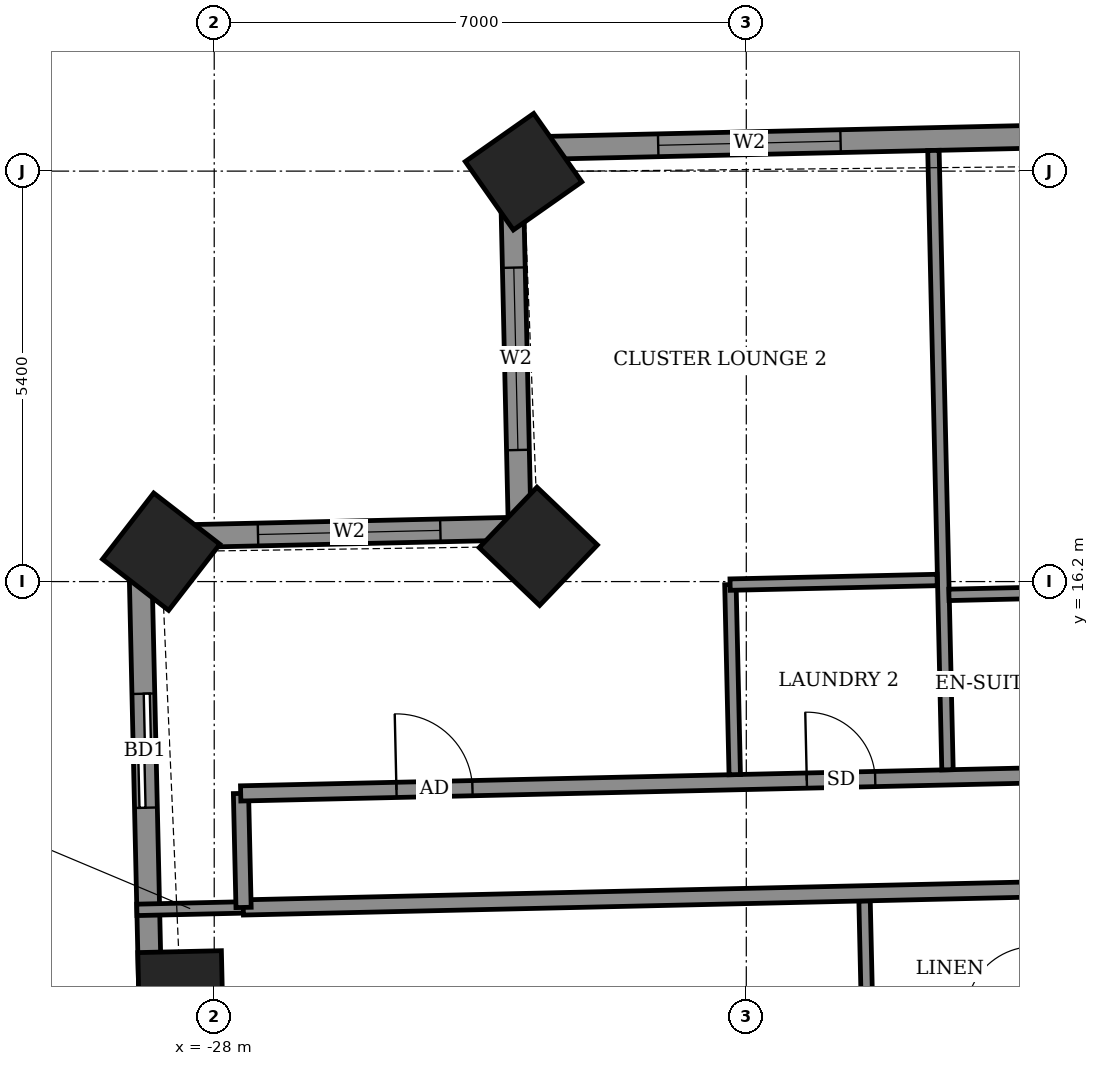
"""IFC4 building model, lengths in metres.
Left out: names, types, materials, properties, quantities, classifications, styles, units other than length and angle.
Written with IfcOpenShell. Run it as: python <this file> out.ifc"""

import sys

from ifc_helpers import new_model, si_unit, direction, frame, frame_2d, origin, origin_2d, place, context, subcontext, project, spatial, rectangle, extrude, element, fill, save


model = new_model("IFC4")
c1 = context("Model", 3, precision=1e-05, world=origin(), true_north=direction((0.0, 1.0)))
c2 = subcontext(c1, "Body", "Model", "MODEL_VIEW")
j1 = project(units=[si_unit("LENGTHUNIT", "METRE"), si_unit("PLANEANGLEUNIT", "RADIAN")], contexts=[c1])
p1 = place(None, origin())
s1 = spatial("IfcSite", under=j1, at=p1, CompositionType="ELEMENT")
p2 = place(p1, origin())
s2 = spatial("IfcBuilding", under=s1, at=p2, CompositionType="ELEMENT")
p3 = place(p2, frame((0.0, 0.0, 231.1)))
s3 = spatial("IfcBuildingStorey", under=s2, at=p3, CompositionType="ELEMENT", Elevation=231.1)
for number, where, z_axis, x_axis in (
    (1, (-23.931, 21.592, -0.55), (0.0, 0.0, 1.0), (-0.818, -0.575, 0.0)),
    (2, (-23.736, 16.664, -0.55), (0.0, 0.0, 1.0), (-0.691, -0.723, 0.0)),
    (3, (-28.698, 16.593, -0.55), (0.0, 0.0, 1.0), (-0.612, -0.791, 0.0)),
    (4, (-28.443, 10.781, -0.55), (0.0, 0.0, 1.0), (0.023, -1.0, 0.0)),
):
    element("IfcColumn", number, at=place(p3, frame(where, z_axis=z_axis, x_axis=x_axis)), inside=s3, PredefinedType="COLUMN", context=c2, shape_type="SweptSolid", body=[
        extrude(rectangle(XDim=1.1, YDim=1.1, at=origin_2d()), origin(), (0.0, 0.0, 1.0), 3.6),
    ])
p4 = place(p3, frame((20.403, 22.905, 0.0), z_axis=(0.0, 0.0, 1.0), x_axis=(-0.99974298964, -0.022670568288, 0.0)))
e5 = element("IfcWall", 5, at=p4, inside=s3, PredefinedType="SOLIDWALL", context=c2, shape_type="SweptSolid", body=[
    extrude(rectangle(XDim=44.509, YDim=0.3, at=frame_2d((22.254, 0.0))), origin(), (0.0, 0.0, 1.0), 2.55),
])
p5 = place(p4, frame((1.62, 0.0, 0.0)))
e6 = element("IfcOpeningElement", 6, at=p5, cuts=e5, PredefinedType="OPENING", context=c2, shape_type="SweptSolid", body=[
    extrude(rectangle(XDim=1.5, YDim=2.4, at=frame_2d((0.75, 1.2))), frame((0.0, 0.16, 0.0), z_axis=(0.0, -1.0, 0.0), x_axis=(1.0, 0.0, 0.0)), (0.0, 0.0, 1.0), 0.32),
])
p6 = place(p4, frame((4.813, 0.0, 0.0)))
e7 = element("IfcOpeningElement", 7, at=p6, cuts=e5, PredefinedType="OPENING", context=c2, shape_type="SweptSolid", body=[
    extrude(rectangle(XDim=1.5, YDim=2.4, at=frame_2d((0.75, 1.2))), frame((0.0, 0.16, 0.0), z_axis=(0.0, -1.0, 0.0), x_axis=(1.0, 0.0, 0.0)), (0.0, 0.0, 1.0), 0.32),
])
p7 = place(p4, frame((9.833, 0.0, 0.0)))
e8 = element("IfcOpeningElement", 8, at=p7, cuts=e5, PredefinedType="OPENING", context=c2, shape_type="SweptSolid", body=[
    extrude(rectangle(XDim=1.5, YDim=2.4, at=frame_2d((0.75, 1.2))), frame((0.0, 0.16, 0.0), z_axis=(0.0, -1.0, 0.0), x_axis=(1.0, 0.0, 0.0)), (0.0, 0.0, 1.0), 0.32),
])
p8 = place(p4, frame((15.522, 0.0, 0.0)))
e9 = element("IfcOpeningElement", 9, at=p8, cuts=e5, PredefinedType="OPENING", context=c2, shape_type="SweptSolid", body=[
    extrude(rectangle(XDim=1.2, YDim=2.4, at=frame_2d((0.6, 1.2))), frame((0.0, 0.16, 0.0), z_axis=(0.0, -1.0, 0.0), x_axis=(1.0, 0.0, 0.0)), (0.0, 0.0, 1.0), 0.32),
])
p9 = place(p4, frame((18.558, 0.0, 0.0)))
e10 = element("IfcOpeningElement", 10, at=p9, cuts=e5, PredefinedType="OPENING", context=c2, shape_type="SweptSolid", body=[
    extrude(rectangle(XDim=1.5, YDim=2.4, at=frame_2d((0.75, 1.2))), frame((0.0, 0.16, 0.0), z_axis=(0.0, -1.0, 0.0), x_axis=(1.0, 0.0, 0.0)), (0.0, 0.0, 1.0), 0.32),
])
p10 = place(p4, frame((23.456, 0.0, 0.0)))
e11 = element("IfcOpeningElement", 11, at=p10, cuts=e5, PredefinedType="OPENING", context=c2, shape_type="SweptSolid", body=[
    extrude(rectangle(XDim=1.5, YDim=2.4, at=frame_2d((0.75, 1.2))), frame((0.0, 0.16, 0.0), z_axis=(0.0, -1.0, 0.0), x_axis=(1.0, 0.0, 0.0)), (0.0, 0.0, 1.0), 0.32),
])
p11 = place(p4, frame((26.89, 0.0, 0.0)))
e12 = element("IfcOpeningElement", 12, at=p11, cuts=e5, PredefinedType="OPENING", context=c2, shape_type="SweptSolid", body=[
    extrude(rectangle(XDim=1.5, YDim=2.4, at=frame_2d((0.75, 1.2))), frame((0.0, 0.16, 0.0), z_axis=(0.0, -1.0, 0.0), x_axis=(1.0, 0.0, 0.0)), (0.0, 0.0, 1.0), 0.32),
])
p12 = place(p4, frame((31.708, 0.0, 0.0)))
e13 = element("IfcOpeningElement", 13, at=p12, cuts=e5, PredefinedType="OPENING", context=c2, shape_type="SweptSolid", body=[
    extrude(rectangle(XDim=1.5, YDim=2.4, at=frame_2d((0.75, 1.2))), frame((0.0, 0.16, 0.0), z_axis=(0.0, -1.0, 0.0), x_axis=(1.0, 0.0, 0.0)), (0.0, 0.0, 1.0), 0.32),
])
p13 = place(p4, frame((35.024, 0.0, 0.0)))
e14 = element("IfcOpeningElement", 14, at=p13, cuts=e5, PredefinedType="OPENING", context=c2, shape_type="SweptSolid", body=[
    extrude(rectangle(XDim=1.5, YDim=2.4, at=frame_2d((0.75, 1.2))), frame((0.0, 0.16, 0.0), z_axis=(0.0, -1.0, 0.0), x_axis=(1.0, 0.0, 0.0)), (0.0, 0.0, 1.0), 0.32),
])
p14 = place(p4, frame((40.173, 0.0, 0.9)))
e15 = element("IfcOpeningElement", 15, at=p14, cuts=e5, PredefinedType="OPENING", context=c2, shape_type="SweptSolid", body=[
    extrude(rectangle(XDim=2.4, YDim=1.5, at=frame_2d((1.2, 0.75))), frame((0.0, 0.16, 0.0), z_axis=(0.0, -1.0, 0.0), x_axis=(1.0, 0.0, 0.0)), (0.0, 0.0, 1.0), 0.32),
])
p15 = place(p3, frame((-24.094, 21.896, 0.0), z_axis=(0.0, 0.0, 1.0), x_axis=(0.022606059803, -0.999744450377, 0.0)))
e16 = element("IfcWall", 16, at=p15, inside=s3, PredefinedType="SOLIDWALL", context=c2, shape_type="SweptSolid", body=[
    extrude(rectangle(XDim=5.0, YDim=0.3, at=frame_2d((2.5, 0.0))), origin(), (0.0, 0.0, 1.0), 2.55),
])
p16 = place(p15, frame((1.566, 0.0, 0.9)))
e17 = element("IfcOpeningElement", 17, at=p16, cuts=e16, PredefinedType="OPENING", context=c2, shape_type="SweptSolid", body=[
    extrude(rectangle(XDim=2.4, YDim=1.5, at=frame_2d((1.2, 0.75))), frame((0.0, 0.16, 0.0), z_axis=(0.0, -1.0, 0.0), x_axis=(1.0, 0.0, 0.0)), (0.0, 0.0, 1.0), 0.32),
])
p17 = place(p3, frame((-23.981, 16.897, 0.0), z_axis=(0.0, 0.0, 1.0), x_axis=(-0.999744350543, -0.022610474516, 0.0)))
e18 = element("IfcWall", 18, at=p17, inside=s3, PredefinedType="SOLIDWALL", context=c2, shape_type="SweptSolid", body=[
    extrude(rectangle(XDim=4.999, YDim=0.3, at=frame_2d((2.5, 0.0))), origin(), (0.0, 0.0, 1.0), 2.55),
])
p18 = place(p17, frame((1.044, 0.0, 0.9)))
e19 = element("IfcOpeningElement", 19, at=p18, cuts=e18, PredefinedType="OPENING", context=c2, shape_type="SweptSolid", body=[
    extrude(rectangle(XDim=2.4, YDim=1.5, at=frame_2d((1.2, 0.75))), frame((0.0, 0.16, 0.0), z_axis=(0.0, -1.0, 0.0), x_axis=(1.0, 0.0, 0.0)), (0.0, 0.0, 1.0), 0.32),
])
p19 = place(p3, frame((-28.979, 16.784, 0.0), z_axis=(0.0, 0.0, 1.0), x_axis=(0.022640773908, -0.999743664825, 0.0)))
e20 = element("IfcWall", 20, at=p19, inside=s3, PredefinedType="SOLIDWALL", context=c2, shape_type="SweptSolid", body=[
    extrude(rectangle(XDim=12.724, YDim=0.3, at=frame_2d((6.362, 0.0))), origin(), (0.0, 0.0, 1.0), 2.55),
])
p20 = place(p19, frame((2.06, 0.0, 0.0)))
e21 = element("IfcOpeningElement", 21, at=p20, cuts=e20, PredefinedType="OPENING", context=c2, shape_type="SweptSolid", body=[
    extrude(rectangle(XDim=1.5, YDim=2.4, at=frame_2d((0.75, 1.2))), frame((0.0, 0.16, 0.0), z_axis=(0.0, -1.0, 0.0), x_axis=(1.0, 0.0, 0.0)), (0.0, 0.0, 1.0), 0.32),
])
p21 = place(p19, frame((7.169, 0.0, 0.9)))
e22 = element("IfcOpeningElement", 22, at=p21, cuts=e20, PredefinedType="OPENING", context=c2, shape_type="SweptSolid", body=[
    extrude(rectangle(XDim=1.2, YDim=1.5, at=frame_2d((0.6, 0.75))), frame((0.0, 0.16, 0.0), z_axis=(0.0, -1.0, 0.0), x_axis=(1.0, 0.0, 0.0)), (0.0, 0.0, 1.0), 0.32),
])
p22 = place(p19, frame((9.899, 0.0, 0.9)))
e23 = element("IfcOpeningElement", 23, at=p22, cuts=e20, PredefinedType="OPENING", context=c2, shape_type="SweptSolid", body=[
    extrude(rectangle(XDim=1.2, YDim=1.5, at=frame_2d((0.6, 0.75))), frame((0.0, 0.16, 0.0), z_axis=(0.0, -1.0, 0.0), x_axis=(1.0, 0.0, 0.0)), (0.0, 0.0, 1.0), 0.32),
])
p23 = place(p3, frame((-19.392, 9.699, 0.0), z_axis=(0.0, 0.0, 1.0), x_axis=(-0.022603288534, 0.999744513037, 0.0)))
e24 = element("IfcWall", 24, at=p23, inside=s3, PredefinedType="PARTITIONING", context=c2, shape_type="SweptSolid", body=[
    extrude(rectangle(XDim=2.301, YDim=0.15, at=frame_2d((1.15, 0.0))), origin(), (0.0, 0.0, 1.0), 3.05),
])
p24 = place(p3, frame((-29.018, 11.881, 0.0), z_axis=(0.0, 0.0, 1.0), x_axis=(0.999740667531, 0.022772739949, 0.0)))
e25 = element("IfcWall", 25, at=p24, inside=s3, PredefinedType="PARTITIONING", context=c2, shape_type="SweptSolid", body=[
    extrude(rectangle(XDim=1.404, YDim=0.15, at=frame_2d((0.702, 0.0))), origin(), (0.0, 0.0, 1.0), 2.55),
])
p25 = place(p3, frame((-27.618, 11.913, 0.0), z_axis=(0.0, 0.0, 1.0), x_axis=(0.999741483035, 0.022736910479, 0.0)))
e26 = element("IfcWall", 26, at=p25, inside=s3, PredefinedType="PARTITIONING", context=c2, shape_type="SweptSolid", body=[
    extrude(rectangle(XDim=10.373, YDim=0.2, at=frame_2d((5.186, 0.0))), origin(), (0.0, 0.0, 1.0), 3.05),
])
p26 = place(p3, frame((-27.614, 11.913, 0.0), z_axis=(0.0, 0.0, 1.0), x_axis=(-0.022617910375, 0.999744182344, 0.0)))
e27 = element("IfcWall", 27, at=p26, inside=s3, PredefinedType="PARTITIONING", context=c2, shape_type="SweptSolid", body=[
    extrude(rectangle(XDim=1.5, YDim=0.2, at=frame_2d((0.75, 0.0))), origin(), (0.0, 0.0, 1.0), 3.05),
])
p27 = place(p3, frame((-27.652, 13.413, 0.0), z_axis=(0.0, 0.0, 1.0), x_axis=(0.999742610679, 0.022687273792, 0.0)))
e28 = element("IfcWall", 28, at=p27, inside=s3, PredefinedType="PARTITIONING", context=c2, shape_type="SweptSolid", body=[
    extrude(rectangle(XDim=50.857, YDim=0.2, at=frame_2d((25.429, 0.0))), origin(), (0.0, 0.0, 1.0), 3.05),
])
p28 = place(p27, frame((49.179, 0.0, 0.0)))
e29 = element("IfcOpeningElement", 29, at=p28, cuts=e28, PredefinedType="OPENING", context=c2, shape_type="SweptSolid", body=[
    extrude(rectangle(XDim=1.0, YDim=2.1, at=frame_2d((0.5, 1.05))), frame((0.0, 0.11, 0.0), z_axis=(0.0, -1.0, 0.0), x_axis=(1.0, 0.0, 0.0)), (0.0, 0.0, 1.0), 0.22),
])
p29 = place(p27, frame((44.9, 0.0, 0.0)))
e30 = element("IfcOpeningElement", 30, at=p29, cuts=e28, PredefinedType="OPENING", context=c2, shape_type="SweptSolid", body=[
    extrude(rectangle(XDim=0.9, YDim=2.1, at=frame_2d((0.45, 1.05))), frame((0.0, 0.11, 0.0), z_axis=(0.0, -1.0, 0.0), x_axis=(1.0, 0.0, 0.0)), (0.0, 0.0, 1.0), 0.22),
])
p30 = place(p27, frame((40.375, 0.0, 0.0)))
e31 = element("IfcOpeningElement", 31, at=p30, cuts=e28, PredefinedType="OPENING", context=c2, shape_type="SweptSolid", body=[
    extrude(rectangle(XDim=0.9, YDim=2.1, at=frame_2d((0.45, 1.05))), frame((0.0, 0.11, 0.0), z_axis=(0.0, -1.0, 0.0), x_axis=(1.0, 0.0, 0.0)), (0.0, 0.0, 1.0), 0.22),
])
p31 = place(p27, frame((38.425, 0.0, 0.0)))
e32 = element("IfcOpeningElement", 32, at=p31, cuts=e28, PredefinedType="OPENING", context=c2, shape_type="SweptSolid", body=[
    extrude(rectangle(XDim=0.9, YDim=2.1, at=frame_2d((0.45, 1.05))), frame((0.0, 0.11, 0.0), z_axis=(0.0, -1.0, 0.0), x_axis=(1.0, 0.0, 0.0)), (0.0, 0.0, 1.0), 0.22),
])
p32 = place(p27, frame((31.625, 0.0, 0.0)))
e33 = element("IfcOpeningElement", 33, at=p32, cuts=e28, PredefinedType="OPENING", context=c2, shape_type="SweptSolid", body=[
    extrude(rectangle(XDim=0.9, YDim=2.1, at=frame_2d((0.45, 1.05))), frame((0.0, 0.11, 0.0), z_axis=(0.0, -1.0, 0.0), x_axis=(1.0, 0.0, 0.0)), (0.0, 0.0, 1.0), 0.22),
])
p33 = place(p27, frame((29.7, 0.0, 0.0)))
e34 = element("IfcOpeningElement", 34, at=p33, cuts=e28, PredefinedType="OPENING", context=c2, shape_type="SweptSolid", body=[
    extrude(rectangle(XDim=0.9, YDim=2.1, at=frame_2d((0.45, 1.05))), frame((0.0, 0.11, 0.0), z_axis=(0.0, -1.0, 0.0), x_axis=(1.0, 0.0, 0.0)), (0.0, 0.0, 1.0), 0.22),
])
p34 = place(p27, frame((22.95, 0.0, 0.0)))
e35 = element("IfcOpeningElement", 35, at=p34, cuts=e28, PredefinedType="OPENING", context=c2, shape_type="SweptSolid", body=[
    extrude(rectangle(XDim=0.9, YDim=2.1, at=frame_2d((0.45, 1.05))), frame((0.0, 0.11, 0.0), z_axis=(0.0, -1.0, 0.0), x_axis=(1.0, 0.0, 0.0)), (0.0, 0.0, 1.0), 0.22),
])
p35 = place(p27, frame((20.95, 0.0, 0.0)))
e36 = element("IfcOpeningElement", 36, at=p35, cuts=e28, PredefinedType="OPENING", context=c2, shape_type="SweptSolid", body=[
    extrude(rectangle(XDim=0.9, YDim=2.1, at=frame_2d((0.45, 1.05))), frame((0.0, 0.11, 0.0), z_axis=(0.0, -1.0, 0.0), x_axis=(1.0, 0.0, 0.0)), (0.0, 0.0, 1.0), 0.22),
])
p36 = place(p27, frame((14.15, 0.0, 0.0)))
e37 = element("IfcOpeningElement", 37, at=p36, cuts=e28, PredefinedType="OPENING", context=c2, shape_type="SweptSolid", body=[
    extrude(rectangle(XDim=0.9, YDim=2.1, at=frame_2d((0.45, 1.05))), frame((0.0, 0.11, 0.0), z_axis=(0.0, -1.0, 0.0), x_axis=(1.0, 0.0, 0.0)), (0.0, 0.0, 1.0), 0.22),
])
p37 = place(p27, frame((12.2, 0.0, 0.0)))
e38 = element("IfcOpeningElement", 38, at=p37, cuts=e28, PredefinedType="OPENING", context=c2, shape_type="SweptSolid", body=[
    extrude(rectangle(XDim=0.9, YDim=2.1, at=frame_2d((0.45, 1.05))), frame((0.0, 0.11, 0.0), z_axis=(0.0, -1.0, 0.0), x_axis=(1.0, 0.0, 0.0)), (0.0, 0.0, 1.0), 0.22),
])
p38 = place(p27, frame((2.05, 0.0, 0.0)))
e39 = element("IfcOpeningElement", 39, at=p38, cuts=e28, PredefinedType="OPENING", context=c2, shape_type="SweptSolid", body=[
    extrude(rectangle(XDim=1.0, YDim=2.1, at=frame_2d((0.5, 1.05))), frame((0.0, 0.11, 0.0), z_axis=(0.0, -1.0, 0.0), x_axis=(1.0, 0.0, 0.0)), (0.0, 0.0, 1.0), 0.22),
])
p39 = place(p27, frame((7.45, 0.0, 0.0)))
e40 = element("IfcOpeningElement", 40, at=p39, cuts=e28, PredefinedType="OPENING", context=c2, shape_type="SweptSolid", body=[
    extrude(rectangle(XDim=0.9, YDim=2.1, at=frame_2d((0.45, 1.05))), frame((0.0, 0.11, 0.0), z_axis=(0.0, -1.0, 0.0), x_axis=(1.0, 0.0, 0.0)), (0.0, 0.0, 1.0), 0.22),
])
p40 = place(p3, frame((-21.152, 13.66, 0.0), z_axis=(0.0, 0.0, 1.0), x_axis=(-0.02274801823, 0.999741230352, 0.0)))
e41 = element("IfcWall", 41, at=p40, inside=s3, PredefinedType="PARTITIONING", context=c2, shape_type="SweptSolid", body=[
    extrude(rectangle(XDim=2.501, YDim=0.15, at=frame_2d((1.25, 0.0))), origin(), (0.0, 0.0, 1.0), 3.05),
])
p41 = place(p3, frame((-18.353, 13.724, 0.0), z_axis=(0.0, 0.0, 1.0), x_axis=(-0.022706435224, 0.999742175663, 0.0)))
e42 = element("IfcWall", 42, at=p41, inside=s3, PredefinedType="PARTITIONING", context=c2, shape_type="SweptSolid", body=[
    extrude(rectangle(XDim=8.15, YDim=0.15, at=frame_2d((4.075, 0.0))), origin(), (0.0, 0.0, 1.0), 2.55),
])
p42 = place(p3, frame((-18.334, 16.025, 0.0), z_axis=(0.0, 0.0, 1.0), x_axis=(0.999740260747, 0.02279059109, 0.0)))
e43 = element("IfcWall", 43, at=p42, inside=s3, PredefinedType="PARTITIONING", context=c2, shape_type="SweptSolid", body=[
    extrude(rectangle(XDim=2.324, YDim=0.15, at=frame_2d((1.162, 0.0))), origin(), (0.0, 0.0, 1.0), 3.05),
])
p43 = place(p3, frame((-21.213, 16.16, 0.0), z_axis=(0.0, 0.0, 1.0), x_axis=(0.999749047428, 0.022401833993, 0.0)))
e44 = element("IfcWall", 44, at=p43, inside=s3, PredefinedType="PARTITIONING", context=c2, shape_type="SweptSolid", body=[
    extrude(rectangle(XDim=2.725, YDim=0.15, at=frame_2d((1.362, 0.0))), origin(), (0.0, 0.0, 1.0), 3.05),
])
p44 = place(p14, origin())
e45 = element("IfcWindow", 45, at=p44, inside=s3, PartitioningType="DOUBLE_PANEL_VERTICAL", PredefinedType="WINDOW", context=c2, shape_type="SweptSolid", body=[
    extrude(rectangle(XDim=2.4, YDim=1.5, at=frame_2d((1.2, 0.75))), frame((0.0, 0.03, 0.0), z_axis=(0.0, -1.0, 0.0), x_axis=(1.0, 0.0, 0.0)), (0.0, 0.0, 1.0), 0.06),
])
fill(e15, e45)
p45 = place(p16, origin())
e46 = element("IfcWindow", 46, at=p45, inside=s3, PartitioningType="DOUBLE_PANEL_VERTICAL", PredefinedType="WINDOW", context=c2, shape_type="SweptSolid", body=[
    extrude(rectangle(XDim=2.4, YDim=1.5, at=frame_2d((1.2, 0.75))), frame((0.0, 0.03, 0.0), z_axis=(0.0, -1.0, 0.0), x_axis=(1.0, 0.0, 0.0)), (0.0, 0.0, 1.0), 0.06),
])
fill(e17, e46)
p46 = place(p18, origin())
e47 = element("IfcWindow", 47, at=p46, inside=s3, PartitioningType="DOUBLE_PANEL_VERTICAL", PredefinedType="WINDOW", context=c2, shape_type="SweptSolid", body=[
    extrude(rectangle(XDim=2.4, YDim=1.5, at=frame_2d((1.2, 0.75))), frame((0.0, 0.03, 0.0), z_axis=(0.0, -1.0, 0.0), x_axis=(1.0, 0.0, 0.0)), (0.0, 0.0, 1.0), 0.06),
])
fill(e19, e47)
p47 = place(p20, origin())
e48 = element("IfcDoor", 48, at=p47, inside=s3, OperationType="SLIDING_TO_LEFT", PredefinedType="DOOR", context=c2, shape_type="SweptSolid", body=[
    extrude(rectangle(XDim=1.5, YDim=2.4, at=frame_2d((0.75, 1.2))), frame((0.0, 0.025, 0.0), z_axis=(0.0, -1.0, 0.0), x_axis=(1.0, 0.0, 0.0)), (0.0, 0.0, 1.0), 0.05),
])
fill(e21, e48)
p48 = place(p38, origin())
e49 = element("IfcDoor", 49, at=p48, inside=s3, OperationType="SINGLE_SWING_RIGHT", PredefinedType="DOOR", context=c2, shape_type="SweptSolid", body=[
    extrude(rectangle(XDim=1.0, YDim=2.1, at=frame_2d((0.5, 1.05))), frame((0.0, 0.025, 0.0), z_axis=(0.0, -1.0, 0.0), x_axis=(1.0, 0.0, 0.0)), (0.0, 0.0, 1.0), 0.05),
])
fill(e39, e49)
p49 = place(p39, origin())
e50 = element("IfcDoor", 50, at=p49, inside=s3, OperationType="SINGLE_SWING_LEFT", PredefinedType="DOOR", context=c2, shape_type="SweptSolid", body=[
    extrude(rectangle(XDim=0.9, YDim=2.1, at=frame_2d((0.45, 1.05))), frame((0.0, 0.025, 0.0), z_axis=(0.0, -1.0, 0.0), x_axis=(1.0, 0.0, 0.0)), (0.0, 0.0, 1.0), 0.05),
])
fill(e40, e50)
save(model, sys.argv[1])
